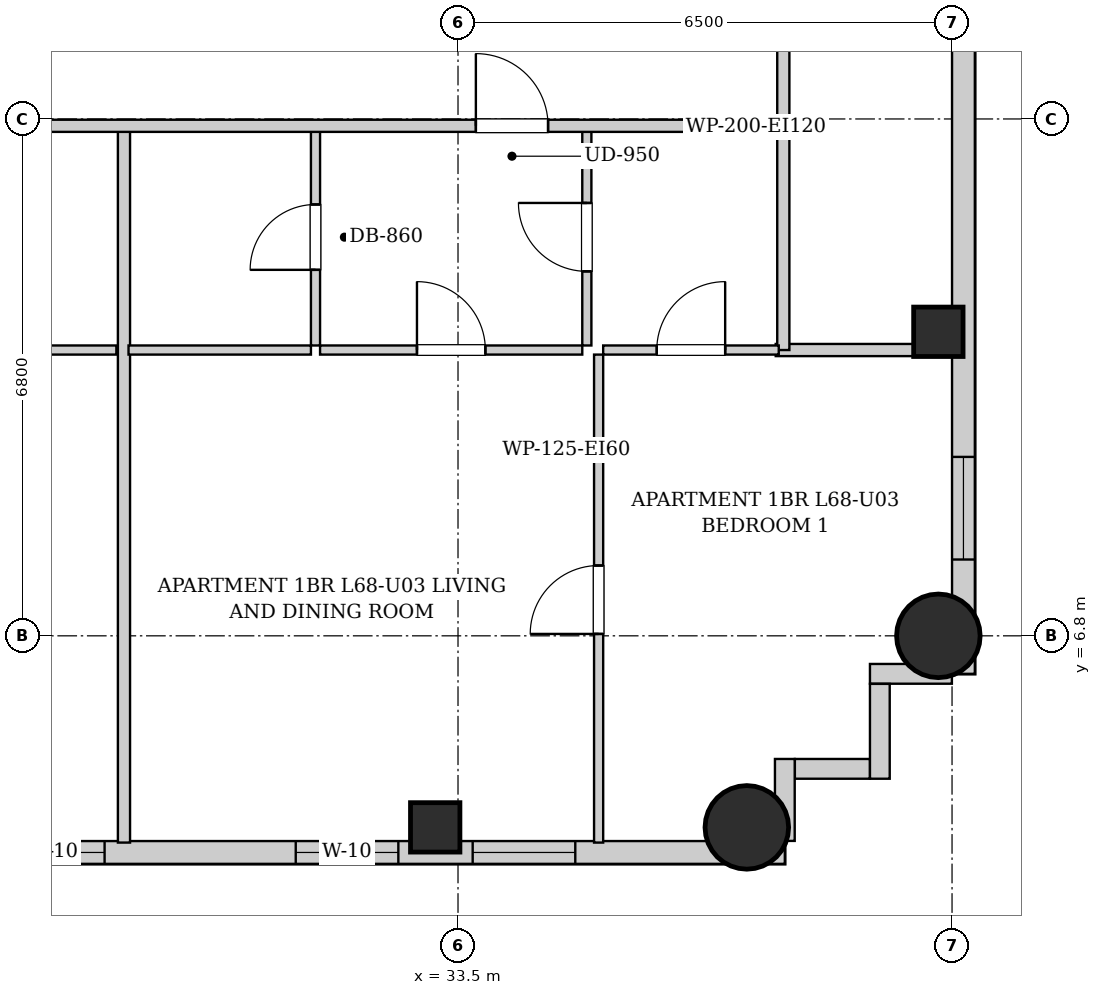
"""IFC4 building model, lengths in metres.
Left out: names, types, materials, properties, quantities, classifications, styles, units other than length and angle.
Written with IfcOpenShell. Run it as: python <this file> out.ifc"""

import sys

from ifc_helpers import new_model, si_unit, direction, frame, frame_2d, origin, origin_2d, place, context, subcontext, project, spatial, rectangle, circle, extrude, element, fill, save


model = new_model("IFC4")
c1 = context("Model", 3, precision=1e-05, world=origin(), true_north=direction((0.0, 1.0)))
c2 = subcontext(c1, "Body", "Model", "MODEL_VIEW")
j1 = project(units=[si_unit("LENGTHUNIT", "METRE"), si_unit("PLANEANGLEUNIT", "RADIAN")], contexts=[c1])
p1 = place(None, origin())
s1 = spatial("IfcSite", under=j1, at=p1, CompositionType="ELEMENT")
p2 = place(p1, origin())
s2 = spatial("IfcBuilding", under=s1, at=p2, CompositionType="ELEMENT")
p3 = place(p2, frame((0.0, 0.0, 234.3)))
s3 = spatial("IfcBuildingStorey", under=s2, at=p3, CompositionType="ELEMENT", Elevation=234.3)
p4 = place(p3, frame((33.2, 4.28, 0.0), z_axis=(0.0, 0.0, 1.0), x_axis=(1.0, 0.0, 0.0)))
e1 = element("IfcColumn", 1, at=p4, inside=s3, PredefinedType="COLUMN", context=c2, shape_type="SweptSolid", body=[
    extrude(rectangle(XDim=0.65, YDim=0.65, at=origin_2d()), origin(), (0.0, 0.0, 1.0), 3.4),
])
for number, where, z_axis, x_axis in (
    (2, (37.3, 4.28, 0.0), (0.0, 0.0, 1.0), (1.0, 0.0, 0.0)),
    (3, (39.82, 6.8, 0.0), (0.0, 0.0, 1.0), (1.0, 0.0, 0.0)),
):
    element("IfcColumn", number, at=place(p3, frame(where, z_axis=z_axis, x_axis=x_axis)), inside=s3, PredefinedType="COLUMN", context=c2, shape_type="SweptSolid", body=[
        extrude(circle(Radius=0.55, at=origin_2d()), origin(), (0.0, 0.0, 1.0), 3.4),
    ])
p5 = place(p3, frame((39.82, 10.8, 0.0), z_axis=(0.0, 0.0, 1.0), x_axis=(1.0, 0.0, 0.0)))
e4 = element("IfcColumn", 4, at=p5, inside=s3, PredefinedType="COLUMN", context=c2, shape_type="SweptSolid", body=[
    extrude(rectangle(XDim=0.65, YDim=0.65, at=origin_2d()), origin(), (0.0, 0.0, 1.0), 3.4),
])
p6 = place(p3, frame((40.15, 37.7, 0.0), z_axis=(0.0, 0.0, 1.0), x_axis=(0.0, -1.0, 0.0)))
e5 = element("IfcWall", 5, at=p6, inside=s3, PredefinedType="SOLIDWALL", context=c2, shape_type="SweptSolid", body=[
    extrude(rectangle(XDim=31.4, YDim=0.3, at=frame_2d((15.7, 0.0))), origin(), (0.0, 0.0, 1.0), 3.14),
])
p7 = place(p6, frame((28.546, 0.0, 0.55)))
e6 = element("IfcOpeningElement", 6, at=p7, cuts=e5, PredefinedType="OPENING", context=c2, shape_type="SweptSolid", body=[
    extrude(rectangle(XDim=1.35, YDim=1.2, at=frame_2d((0.675, 0.6))), frame((0.0, 0.16, 0.0), z_axis=(0.0, -1.0, 0.0), x_axis=(1.0, 0.0, 0.0)), (0.0, 0.0, 1.0), 0.32),
])
p8 = place(p6, frame((1.504, 0.0, 0.55)))
e7 = element("IfcOpeningElement", 7, at=p8, cuts=e5, PredefinedType="OPENING", context=c2, shape_type="SweptSolid", body=[
    extrude(rectangle(XDim=1.35, YDim=1.2, at=frame_2d((0.675, 0.6))), frame((0.0, 0.16, 0.0), z_axis=(0.0, -1.0, 0.0), x_axis=(1.0, 0.0, 0.0)), (0.0, 0.0, 1.0), 0.32),
])
p9 = place(p6, frame((18.2, 0.0, 0.55)))
e8 = element("IfcOpeningElement", 8, at=p9, cuts=e5, PredefinedType="OPENING", context=c2, shape_type="SweptSolid", body=[
    extrude(rectangle(XDim=1.35, YDim=1.2, at=frame_2d((0.675, 0.6))), frame((0.0, 0.16, 0.0), z_axis=(0.0, -1.0, 0.0), x_axis=(1.0, 0.0, 0.0)), (0.0, 0.0, 1.0), 0.32),
])
p10 = place(p6, frame((19.81, 0.0, 0.55)))
e9 = element("IfcOpeningElement", 9, at=p10, cuts=e5, PredefinedType="OPENING", context=c2, shape_type="SweptSolid", body=[
    extrude(rectangle(XDim=1.35, YDim=1.2, at=frame_2d((0.675, 0.6))), frame((0.0, 0.16, 0.0), z_axis=(0.0, -1.0, 0.0), x_axis=(1.0, 0.0, 0.0)), (0.0, 0.0, 1.0), 0.32),
])
p11 = place(p6, frame((11.043, 0.0, 0.55)))
e10 = element("IfcOpeningElement", 10, at=p11, cuts=e5, PredefinedType="OPENING", context=c2, shape_type="SweptSolid", body=[
    extrude(rectangle(XDim=1.35, YDim=1.2, at=frame_2d((0.675, 0.6))), frame((0.0, 0.16, 0.0), z_axis=(0.0, -1.0, 0.0), x_axis=(1.0, 0.0, 0.0)), (0.0, 0.0, 1.0), 0.32),
])
p12 = place(p6, frame((9.185, 0.0, 0.55)))
e11 = element("IfcOpeningElement", 11, at=p12, cuts=e5, PredefinedType="OPENING", context=c2, shape_type="SweptSolid", body=[
    extrude(rectangle(XDim=1.35, YDim=1.2, at=frame_2d((0.675, 0.6))), frame((0.0, 0.16, 0.0), z_axis=(0.0, -1.0, 0.0), x_axis=(1.0, 0.0, 0.0)), (0.0, 0.0, 1.0), 0.32),
])
p13 = place(p3, frame((37.8, 3.95, 0.0), z_axis=(0.0, 0.0, 1.0), x_axis=(-1.0, 0.0, 0.0)))
e12 = element("IfcWall", 12, at=p13, inside=s3, PredefinedType="SOLIDWALL", context=c2, shape_type="SweptSolid", body=[
    extrude(rectangle(XDim=17.6, YDim=0.3, at=frame_2d((8.8, 0.0))), origin(), (0.0, 0.0, 1.0), 3.14),
])
p14 = place(p13, frame((15.345, 0.0, 0.55)))
e13 = element("IfcOpeningElement", 13, at=p14, cuts=e12, PredefinedType="OPENING", context=c2, shape_type="SweptSolid", body=[
    extrude(rectangle(XDim=1.35, YDim=1.2, at=frame_2d((0.675, 0.6))), frame((0.0, 0.16, 0.0), z_axis=(0.0, -1.0, 0.0), x_axis=(1.0, 0.0, 0.0)), (0.0, 0.0, 1.0), 0.32),
])
p15 = place(p13, frame((8.95, 0.0, 0.55)))
e14 = element("IfcOpeningElement", 14, at=p15, cuts=e12, PredefinedType="OPENING", context=c2, shape_type="SweptSolid", body=[
    extrude(rectangle(XDim=1.35, YDim=1.2, at=frame_2d((0.675, 0.6))), frame((0.0, 0.16, 0.0), z_axis=(0.0, -1.0, 0.0), x_axis=(1.0, 0.0, 0.0)), (0.0, 0.0, 1.0), 0.32),
])
p16 = place(p13, frame((5.085, 0.0, 0.55)))
e15 = element("IfcOpeningElement", 15, at=p16, cuts=e12, PredefinedType="OPENING", context=c2, shape_type="SweptSolid", body=[
    extrude(rectangle(XDim=1.35, YDim=1.2, at=frame_2d((0.675, 0.6))), frame((0.0, 0.16, 0.0), z_axis=(0.0, -1.0, 0.0), x_axis=(1.0, 0.0, 0.0)), (0.0, 0.0, 1.0), 0.32),
])
p17 = place(p13, frame((2.757, 0.0, 0.55)))
e16 = element("IfcOpeningElement", 16, at=p17, cuts=e12, PredefinedType="OPENING", context=c2, shape_type="SweptSolid", body=[
    extrude(rectangle(XDim=1.35, YDim=1.2, at=frame_2d((0.675, 0.6))), frame((0.0, 0.16, 0.0), z_axis=(0.0, -1.0, 0.0), x_axis=(1.0, 0.0, 0.0)), (0.0, 0.0, 1.0), 0.32),
])
p18 = place(p3, frame((39.998, 6.3, 0.0), z_axis=(0.0, 0.0, 1.0), x_axis=(-1.0, 0.0, 0.0)))
e17 = element("IfcWall", 17, at=p18, inside=s3, PredefinedType="SOLIDWALL", context=c2, shape_type="SweptSolid", body=[
    extrude(rectangle(XDim=1.078, YDim=0.26, at=frame_2d((0.539, 0.0))), origin(), (0.0, 0.0, 1.0), 3.14),
])
p19 = place(p3, frame((39.05, 6.168, 0.0), z_axis=(0.0, 0.0, 1.0), x_axis=(0.0, -1.0, 0.0)))
e18 = element("IfcWall", 18, at=p19, inside=s3, PredefinedType="SOLIDWALL", context=c2, shape_type="SweptSolid", body=[
    extrude(rectangle(XDim=1.248, YDim=0.26, at=frame_2d((0.624, 0.0))), origin(), (0.0, 0.0, 1.0), 3.14),
])
p20 = place(p3, frame((38.918, 5.05, 0.0), z_axis=(0.0, 0.0, 1.0), x_axis=(-1.0, 0.0, 0.0)))
e19 = element("IfcWall", 19, at=p20, inside=s3, PredefinedType="SOLIDWALL", context=c2, shape_type="SweptSolid", body=[
    extrude(rectangle(XDim=0.986, YDim=0.26, at=frame_2d((0.493, 0.0))), origin(), (0.0, 0.0, 1.0), 3.14),
])
p21 = place(p3, frame((37.8, 5.18, 0.0), z_axis=(0.0, 0.0, 1.0), x_axis=(0.0, -1.0, 0.0)))
e20 = element("IfcWall", 20, at=p21, inside=s3, PredefinedType="SOLIDWALL", context=c2, shape_type="SweptSolid", body=[
    extrude(rectangle(XDim=1.078, YDim=0.26, at=frame_2d((0.539, 0.0))), origin(), (0.0, 0.0, 1.0), 3.14),
])
p22 = place(p3, frame((37.78, 13.51, 0.0), z_axis=(0.0, 0.0, 1.0), x_axis=(0.0, 1.0, 0.0)))
e21 = element("IfcWall", 21, at=p22, inside=s3, PredefinedType="PARTITIONING", context=c2, shape_type="SweptSolid", body=[
    extrude(rectangle(XDim=1.58, YDim=0.16, at=frame_2d((0.79, 0.0))), origin(), (0.0, 0.0, 1.0), 3.14),
])
p23 = place(p3, frame((25.25, 10.56, 0.0), z_axis=(0.0, 0.0, 1.0), x_axis=(1.0, 0.0, 0.0)))
e22 = element("IfcWall", 22, at=p23, inside=s3, PredefinedType="PARTITIONING", context=c2, shape_type="SweptSolid", body=[
    extrude(rectangle(XDim=3.755, YDim=0.12, at=frame_2d((1.877, 0.0))), origin(), (0.0, 0.0, 1.0), 3.14),
])
p24 = place(p23, frame((1.427, 0.0, 0.0)))
e23 = element("IfcOpeningElement", 23, at=p24, cuts=e22, PredefinedType="OPENING", context=c2, shape_type="SweptSolid", body=[
    extrude(rectangle(XDim=0.9, YDim=2.05, at=frame_2d((0.45, 1.025))), frame((0.0, 0.07, 0.0), z_axis=(0.0, -1.0, 0.0), x_axis=(1.0, 0.0, 0.0)), (0.0, 0.0, 1.0), 0.14),
])
p25 = place(p3, frame((37.68, 10.56, 0.0), z_axis=(0.0, 0.0, 1.0), x_axis=(1.0, 0.0, 0.0)))
e24 = element("IfcWall", 24, at=p25, inside=s3, PredefinedType="PARTITIONING", context=c2, shape_type="SweptSolid", body=[
    extrude(rectangle(XDim=2.34, YDim=0.16, at=frame_2d((1.17, 0.0))), origin(), (0.0, 0.0, 1.0), 3.14),
])
p26 = place(p3, frame((37.78, 10.56, 0.0), z_axis=(0.0, 0.0, 1.0), x_axis=(0.0, 1.0, 0.0)))
e25 = element("IfcWall", 25, at=p26, inside=s3, PredefinedType="PARTITIONING", context=c2, shape_type="SweptSolid", body=[
    extrude(rectangle(XDim=2.91, YDim=0.16, at=frame_2d((1.455, 0.0))), origin(), (0.0, 0.0, 1.0), 3.14),
])
p27 = place(p3, frame((29.105, 4.08, 0.0), z_axis=(0.0, 0.0, 1.0), x_axis=(0.0, 1.0, 0.0)))
e26 = element("IfcWall", 26, at=p27, inside=s3, PredefinedType="PARTITIONING", context=c2, shape_type="SweptSolid", body=[
    extrude(rectangle(XDim=9.39, YDim=0.16, at=frame_2d((4.695, 0.0))), origin(), (0.0, 0.0, 1.0), 3.14),
])
p28 = place(p3, frame((31.625, 10.62, 0.0), z_axis=(0.0, 0.0, 1.0), x_axis=(0.0, 1.0, 0.0)))
e27 = element("IfcWall", 27, at=p28, inside=s3, PredefinedType="PARTITIONING", context=c2, shape_type="SweptSolid", body=[
    extrude(rectangle(XDim=2.85, YDim=0.12, at=frame_2d((1.425, 0.0))), origin(), (0.0, 0.0, 1.0), 3.14),
])
p29 = place(p28, frame((0.995, 0.0, 0.0)))
e28 = element("IfcOpeningElement", 28, at=p29, cuts=e27, PredefinedType="OPENING", context=c2, shape_type="SweptSolid", body=[
    extrude(rectangle(XDim=0.86, YDim=2.05, at=frame_2d((0.43, 1.025))), frame((0.0, 0.07, 0.0), z_axis=(0.0, -1.0, 0.0), x_axis=(1.0, 0.0, 0.0)), (0.0, 0.0, 1.0), 0.14),
])
p30 = place(p3, frame((29.165, 10.56, 0.0), z_axis=(0.0, 0.0, 1.0), x_axis=(1.0, 0.0, 0.0)))
e29 = element("IfcWall", 29, at=p30, inside=s3, PredefinedType="PARTITIONING", context=c2, shape_type="SweptSolid", body=[
    extrude(rectangle(XDim=2.4, YDim=0.12, at=frame_2d((1.2, 0.0))), origin(), (0.0, 0.0, 1.0), 3.14),
])
p31 = place(p3, frame((35.195, 10.62, 0.0), z_axis=(0.0, 0.0, 1.0), x_axis=(0.0, 1.0, 0.0)))
e30 = element("IfcWall", 30, at=p31, inside=s3, PredefinedType="PARTITIONING", context=c2, shape_type="SweptSolid", body=[
    extrude(rectangle(XDim=2.85, YDim=0.12, at=frame_2d((1.425, 0.0))), origin(), (0.0, 0.0, 1.0), 3.14),
])
p32 = place(p31, frame((0.975, 0.0, 0.0)))
e31 = element("IfcOpeningElement", 31, at=p32, cuts=e30, PredefinedType="OPENING", context=c2, shape_type="SweptSolid", body=[
    extrude(rectangle(XDim=0.9, YDim=2.05, at=frame_2d((0.45, 1.025))), frame((0.0, 0.07, 0.0), z_axis=(0.0, -1.0, 0.0), x_axis=(1.0, 0.0, 0.0)), (0.0, 0.0, 1.0), 0.14),
])
p33 = place(p3, frame((31.685, 10.56, 0.0), z_axis=(0.0, 0.0, 1.0), x_axis=(1.0, 0.0, 0.0)))
e32 = element("IfcWall", 32, at=p33, inside=s3, PredefinedType="PARTITIONING", context=c2, shape_type="SweptSolid", body=[
    extrude(rectangle(XDim=3.45, YDim=0.12, at=frame_2d((1.725, 0.0))), origin(), (0.0, 0.0, 1.0), 3.14),
])
p34 = place(p33, frame((1.275, 0.0, 0.0)))
e33 = element("IfcOpeningElement", 33, at=p34, cuts=e32, PredefinedType="OPENING", context=c2, shape_type="SweptSolid", body=[
    extrude(rectangle(XDim=0.9, YDim=2.05, at=frame_2d((0.45, 1.025))), frame((0.0, 0.07, 0.0), z_axis=(0.0, -1.0, 0.0), x_axis=(1.0, 0.0, 0.0)), (0.0, 0.0, 1.0), 0.14),
])
p35 = place(p3, frame((35.41, 10.56, 0.0), z_axis=(0.0, 0.0, 1.0), x_axis=(1.0, 0.0, 0.0)))
e34 = element("IfcWall", 34, at=p35, inside=s3, PredefinedType="PARTITIONING", context=c2, shape_type="SweptSolid", body=[
    extrude(rectangle(XDim=2.31, YDim=0.12, at=frame_2d((1.155, 0.0))), origin(), (0.0, 0.0, 1.0), 3.14),
])
p36 = place(p35, frame((0.705, 0.0, 0.0)))
e35 = element("IfcOpeningElement", 35, at=p36, cuts=e34, PredefinedType="OPENING", context=c2, shape_type="SweptSolid", body=[
    extrude(rectangle(XDim=0.9, YDim=2.05, at=frame_2d((0.45, 1.025))), frame((0.0, 0.07, 0.0), z_axis=(0.0, -1.0, 0.0), x_axis=(1.0, 0.0, 0.0)), (0.0, 0.0, 1.0), 0.14),
])
p37 = place(p3, frame((35.35, 4.08, 0.0), z_axis=(0.0, 0.0, 1.0), x_axis=(0.0, 1.0, 0.0)))
e36 = element("IfcWall", 36, at=p37, inside=s3, PredefinedType="PARTITIONING", context=c2, shape_type="SweptSolid", body=[
    extrude(rectangle(XDim=6.42, YDim=0.12, at=frame_2d((3.21, 0.0))), origin(), (0.0, 0.0, 1.0), 3.14),
])
p38 = place(p37, frame((2.745, 0.0, 0.0)))
e37 = element("IfcOpeningElement", 37, at=p38, cuts=e36, PredefinedType="OPENING", context=c2, shape_type="SweptSolid", body=[
    extrude(rectangle(XDim=0.9, YDim=2.05, at=frame_2d((0.45, 1.025))), frame((0.0, 0.07, 0.0), z_axis=(0.0, -1.0, 0.0), x_axis=(1.0, 0.0, 0.0)), (0.0, 0.0, 1.0), 0.14),
])
p39 = place(p3, frame((13.15, 13.51, 0.0), z_axis=(0.0, 0.0, 1.0), x_axis=(1.0, 0.0, 0.0)))
e38 = element("IfcWall", 38, at=p39, inside=s3, PredefinedType="PARTITIONING", context=c2, shape_type="SweptSolid", body=[
    extrude(rectangle(XDim=24.6, YDim=0.16, at=frame_2d((12.3, 0.0))), origin(), (0.0, 0.0, 1.0), 3.14),
])
p40 = place(p39, frame((5.185, 0.0, 0.0)))
e39 = element("IfcOpeningElement", 39, at=p40, cuts=e38, PredefinedType="OPENING", context=c2, shape_type="SweptSolid", body=[
    extrude(rectangle(XDim=0.95, YDim=2.1, at=frame_2d((0.475, 1.05))), frame((0.0, 0.09, 0.0), z_axis=(0.0, -1.0, 0.0), x_axis=(1.0, 0.0, 0.0)), (0.0, 0.0, 1.0), 0.18),
])
p41 = place(p39, frame((13.503, 0.0, 0.0)))
e40 = element("IfcOpeningElement", 40, at=p41, cuts=e38, PredefinedType="OPENING", context=c2, shape_type="SweptSolid", body=[
    extrude(rectangle(XDim=0.95, YDim=2.1, at=frame_2d((0.475, 1.05))), frame((0.0, 0.09, 0.0), z_axis=(0.0, -1.0, 0.0), x_axis=(1.0, 0.0, 0.0)), (0.0, 0.0, 1.0), 0.18),
])
p42 = place(p39, frame((20.585, 0.0, 0.0)))
e41 = element("IfcOpeningElement", 41, at=p42, cuts=e38, PredefinedType="OPENING", context=c2, shape_type="SweptSolid", body=[
    extrude(rectangle(XDim=0.95, YDim=2.1, at=frame_2d((0.475, 1.05))), frame((0.0, 0.09, 0.0), z_axis=(0.0, -1.0, 0.0), x_axis=(1.0, 0.0, 0.0)), (0.0, 0.0, 1.0), 0.18),
])
p43 = place(p29, origin())
e42 = element("IfcDoor", 42, at=p43, inside=s3, OperationType="SINGLE_SWING_LEFT", PredefinedType="DOOR", context=c2, shape_type="SweptSolid", body=[
    extrude(rectangle(XDim=0.86, YDim=2.05, at=frame_2d((0.43, 1.025))), frame((0.0, 0.025, 0.0), z_axis=(0.0, -1.0, 0.0), x_axis=(1.0, 0.0, 0.0)), (0.0, 0.0, 1.0), 0.05),
])
fill(e28, e42)
p44 = place(p32, origin())
e43 = element("IfcDoor", 43, at=p44, inside=s3, OperationType="SINGLE_SWING_RIGHT", PredefinedType="DOOR", context=c2, shape_type="SweptSolid", body=[
    extrude(rectangle(XDim=0.9, YDim=2.05, at=frame_2d((0.45, 1.025))), frame((0.0, 0.025, 0.0), z_axis=(0.0, -1.0, 0.0), x_axis=(1.0, 0.0, 0.0)), (0.0, 0.0, 1.0), 0.05),
])
fill(e31, e43)
p45 = place(p34, origin())
e44 = element("IfcDoor", 44, at=p45, inside=s3, OperationType="SINGLE_SWING_LEFT", PredefinedType="DOOR", context=c2, shape_type="SweptSolid", body=[
    extrude(rectangle(XDim=0.9, YDim=2.05, at=frame_2d((0.45, 1.025))), frame((0.0, 0.025, 0.0), z_axis=(0.0, -1.0, 0.0), x_axis=(1.0, 0.0, 0.0)), (0.0, 0.0, 1.0), 0.05),
])
fill(e33, e44)
p46 = place(p36, origin())
e45 = element("IfcDoor", 45, at=p46, inside=s3, OperationType="SINGLE_SWING_RIGHT", PredefinedType="DOOR", context=c2, shape_type="SweptSolid", body=[
    extrude(rectangle(XDim=0.9, YDim=2.05, at=frame_2d((0.45, 1.025))), frame((0.0, 0.025, 0.0), z_axis=(0.0, -1.0, 0.0), x_axis=(1.0, 0.0, 0.0)), (0.0, 0.0, 1.0), 0.05),
])
fill(e35, e45)
p47 = place(p38, origin())
e46 = element("IfcDoor", 46, at=p47, inside=s3, OperationType="SINGLE_SWING_LEFT", PredefinedType="DOOR", context=c2, shape_type="SweptSolid", body=[
    extrude(rectangle(XDim=0.9, YDim=2.05, at=frame_2d((0.45, 1.025))), frame((0.0, 0.025, 0.0), z_axis=(0.0, -1.0, 0.0), x_axis=(1.0, 0.0, 0.0)), (0.0, 0.0, 1.0), 0.05),
])
fill(e37, e46)
p48 = place(p42, origin())
e47 = element("IfcDoor", 47, at=p48, inside=s3, OperationType="SINGLE_SWING_LEFT", PredefinedType="DOOR", context=c2, shape_type="SweptSolid", body=[
    extrude(rectangle(XDim=0.95, YDim=2.1, at=frame_2d((0.475, 1.05))), frame((0.0, 0.025, 0.0), z_axis=(0.0, -1.0, 0.0), x_axis=(1.0, 0.0, 0.0)), (0.0, 0.0, 1.0), 0.05),
])
fill(e41, e47)
p49 = place(p15, origin())
e48 = element("IfcWindow", 48, at=p49, inside=s3, PartitioningType="SINGLE_PANEL", PredefinedType="WINDOW", context=c2, shape_type="SweptSolid", body=[
    extrude(rectangle(XDim=1.35, YDim=1.2, at=frame_2d((0.675, 0.6))), frame((0.0, 0.03, 0.0), z_axis=(0.0, -1.0, 0.0), x_axis=(1.0, 0.0, 0.0)), (0.0, 0.0, 1.0), 0.06),
])
fill(e14, e48)
p50 = place(p16, origin())
e49 = element("IfcWindow", 49, at=p50, inside=s3, PartitioningType="SINGLE_PANEL", PredefinedType="WINDOW", context=c2, shape_type="SweptSolid", body=[
    extrude(rectangle(XDim=1.35, YDim=1.2, at=frame_2d((0.675, 0.6))), frame((0.0, 0.03, 0.0), z_axis=(0.0, -1.0, 0.0), x_axis=(1.0, 0.0, 0.0)), (0.0, 0.0, 1.0), 0.06),
])
fill(e15, e49)
p51 = place(p17, origin())
e50 = element("IfcWindow", 50, at=p51, inside=s3, PartitioningType="SINGLE_PANEL", PredefinedType="WINDOW", context=c2, shape_type="SweptSolid", body=[
    extrude(rectangle(XDim=1.35, YDim=1.2, at=frame_2d((0.675, 0.6))), frame((0.0, 0.03, 0.0), z_axis=(0.0, -1.0, 0.0), x_axis=(1.0, 0.0, 0.0)), (0.0, 0.0, 1.0), 0.06),
])
fill(e16, e50)
p52 = place(p7, origin())
e51 = element("IfcWindow", 51, at=p52, inside=s3, PartitioningType="SINGLE_PANEL", PredefinedType="WINDOW", context=c2, shape_type="SweptSolid", body=[
    extrude(rectangle(XDim=1.35, YDim=1.2, at=frame_2d((0.675, 0.6))), frame((0.0, 0.03, 0.0), z_axis=(0.0, -1.0, 0.0), x_axis=(1.0, 0.0, 0.0)), (0.0, 0.0, 1.0), 0.06),
])
fill(e6, e51)
save(model, sys.argv[1])
